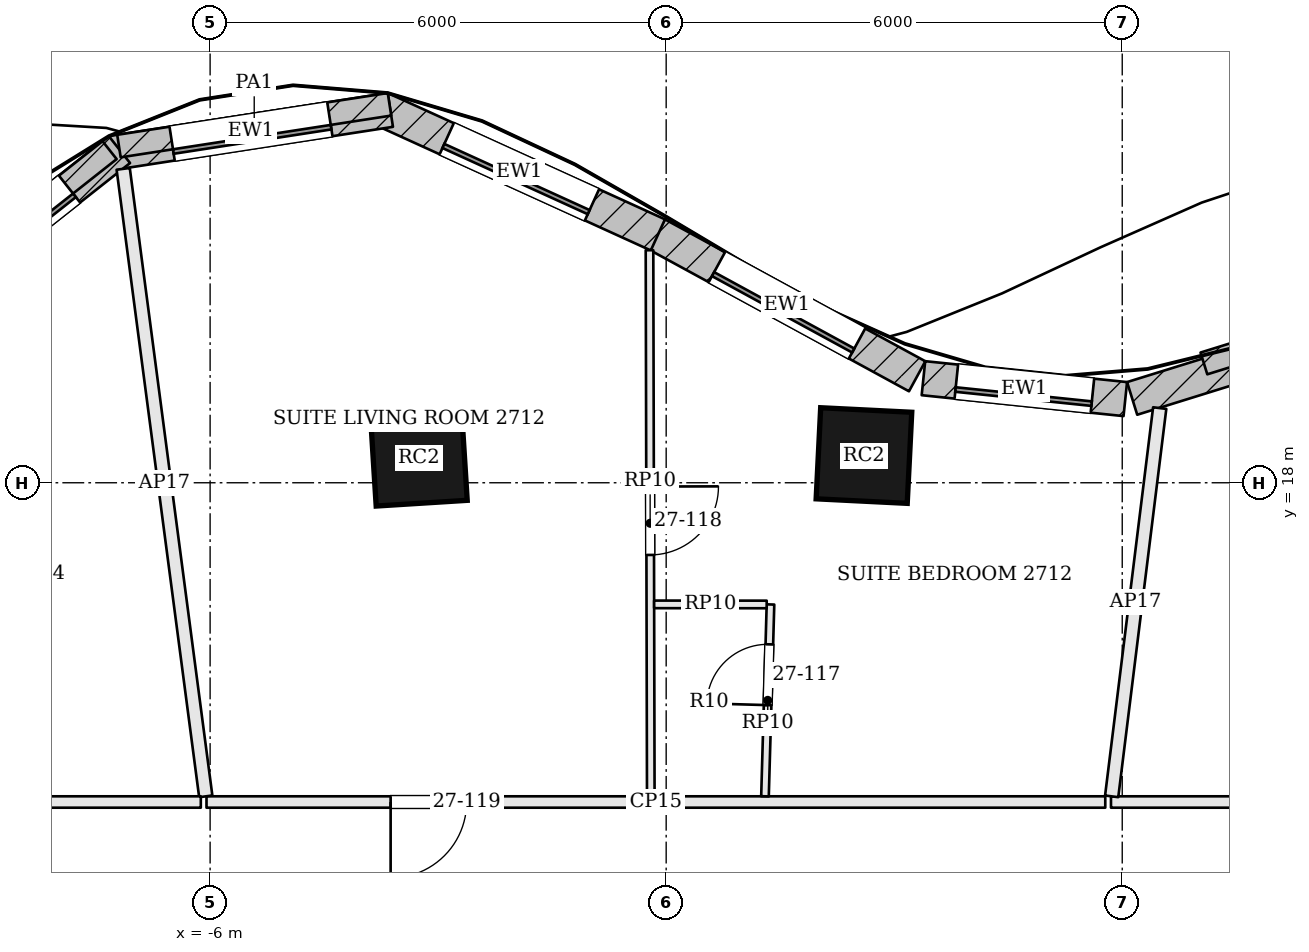
"""IFC4 building model, lengths in metres.
Left out: names, types, materials, properties, quantities, classifications, styles, units other than length and angle.
Written with IfcOpenShell. Run it as: python <this file> out.ifc"""

import sys

from ifc_helpers import new_model, si_unit, direction, frame, frame_2d, origin, origin_2d, place, context, subcontext, project, spatial, rectangle, extrude, element, fill, save


model = new_model("IFC4")
c1 = context("Model", 3, precision=1e-05, world=origin(), true_north=direction((0.0, 1.0)))
c2 = subcontext(c1, "Body", "Model", "MODEL_VIEW")
j1 = project(units=[si_unit("LENGTHUNIT", "METRE"), si_unit("PLANEANGLEUNIT", "RADIAN")], contexts=[c1])
p1 = place(None, origin())
s1 = spatial("IfcSite", under=j1, at=p1, CompositionType="ELEMENT")
p2 = place(p1, origin())
s2 = spatial("IfcBuilding", under=s1, at=p2, CompositionType="ELEMENT")
p3 = place(p2, frame((0.0, 0.0, 114.0)))
s3 = spatial("IfcBuildingStorey", under=s2, at=p3, CompositionType="ELEMENT", Elevation=114.0)
for number, where, z_axis, x_axis in (
    (1, (2.602, 18.358, 0.0), (0.0, 0.0, 1.0), (-0.999, 0.05, 0.0)),
    (2, (-3.254, 18.33, 0.0), (0.0, 0.0, 1.0), (-0.998, -0.063, 0.0)),
):
    element("IfcColumn", number, at=place(p3, frame(where, z_axis=z_axis, x_axis=x_axis)), inside=s3, PredefinedType="COLUMN", context=c2, shape_type="SweptSolid", body=[
        extrude(rectangle(XDim=1.2, YDim=1.2, at=origin_2d()), origin(), (0.0, 0.0, 1.0), 3.6),
    ])
p4 = place(p3, frame((11.007, 20.625, 0.0), z_axis=(0.0, 0.0, 1.0), x_axis=(-0.954949254112, -0.296769139352, 0.0)))
e3 = element("IfcWall", 3, at=p4, inside=s3, PredefinedType="SOLIDWALL", context=c2, shape_type="SweptSolid", body=[
    extrude(rectangle(XDim=5.106, YDim=0.45, at=frame_2d((2.553, 0.0))), origin(), (0.0, 0.0, 1.0), 3.4),
])
p5 = place(p4, frame((1.503, 0.0, 0.9)))
e4 = element("IfcOpeningElement", 4, at=p5, cuts=e3, PredefinedType="OPENING", context=c2, shape_type="SweptSolid", body=[
    extrude(rectangle(XDim=2.1, YDim=2.0, at=frame_2d((1.05, 1.0))), frame((0.0, 0.235, 0.0), z_axis=(0.0, -1.0, 0.0), x_axis=(1.0, 0.0, 0.0)), (0.0, 0.0, 1.0), 0.47),
])
p6 = place(p3, frame((6.04, 19.101, 0.0), z_axis=(0.0, 0.0, 1.0), x_axis=(-0.994675968472, 0.103052014752, 0.0)))
e5 = element("IfcWall", 5, at=p6, inside=s3, PredefinedType="SOLIDWALL", context=c2, shape_type="SweptSolid", body=[
    extrude(rectangle(XDim=2.67, YDim=0.45, at=frame_2d((1.335, 0.0))), origin(), (0.0, 0.0, 1.0), 3.4),
])
p7 = place(p6, frame((0.435, 0.0, 0.9)))
e6 = element("IfcOpeningElement", 6, at=p7, cuts=e5, PredefinedType="OPENING", context=c2, shape_type="SweptSolid", body=[
    extrude(rectangle(XDim=1.8, YDim=2.0, at=frame_2d((0.9, 1.0))), frame((0.0, 0.235, 0.0), z_axis=(0.0, -1.0, 0.0), x_axis=(1.0, 0.0, 0.0)), (0.0, 0.0, 1.0), 0.47),
])
p8 = place(p3, frame((3.302, 19.401, 0.0), z_axis=(0.0, 0.0, 1.0), x_axis=(-0.878060540763, 0.47854956562, 0.0)))
e7 = element("IfcWall", 7, at=p8, inside=s3, PredefinedType="SOLIDWALL", context=c2, shape_type="SweptSolid", body=[
    extrude(rectangle(XDim=3.901, YDim=0.45, at=frame_2d((1.951, 0.0))), origin(), (0.0, 0.0, 1.0), 3.4),
])
p9 = place(p8, frame((0.901, 0.0, 0.9)))
e8 = element("IfcOpeningElement", 8, at=p9, cuts=e7, PredefinedType="OPENING", context=c2, shape_type="SweptSolid", body=[
    extrude(rectangle(XDim=2.1, YDim=2.0, at=frame_2d((1.05, 1.0))), frame((0.0, 0.235, 0.0), z_axis=(0.0, -1.0, 0.0), x_axis=(1.0, 0.0, 0.0)), (0.0, 0.0, 1.0), 0.47),
])
p10 = place(p3, frame((-0.109, 21.261, 0.0), z_axis=(0.0, 0.0, 1.0), x_axis=(-0.910040573706, 0.414519184367, 0.0)))
e9 = element("IfcWall", 9, at=p10, inside=s3, PredefinedType="SOLIDWALL", context=c2, shape_type="SweptSolid", body=[
    extrude(rectangle(XDim=4.006, YDim=0.45, at=frame_2d((2.003, 0.0))), origin(), (0.0, 0.0, 1.0), 3.4),
])
p11 = place(p10, frame((0.953, 0.0, 0.9)))
e10 = element("IfcOpeningElement", 10, at=p11, cuts=e9, PredefinedType="OPENING", context=c2, shape_type="SweptSolid", body=[
    extrude(rectangle(XDim=2.1, YDim=2.0, at=frame_2d((1.05, 1.0))), frame((0.0, 0.235, 0.0), z_axis=(0.0, -1.0, 0.0), x_axis=(1.0, 0.0, 0.0)), (0.0, 0.0, 1.0), 0.47),
])
p12 = place(p3, frame((-3.629, 22.905, 0.0), z_axis=(0.0, 0.0, 1.0), x_axis=(-0.988300084321, -0.152521943772, 0.0)))
e11 = element("IfcWall", 11, at=p12, inside=s3, PredefinedType="SOLIDWALL", context=c2, shape_type="SweptSolid", body=[
    extrude(rectangle(XDim=3.71, YDim=0.45, at=frame_2d((1.855, 0.0))), origin(), (0.0, 0.0, 1.0), 3.4),
])
p13 = place(p12, frame((0.805, 0.0, 0.9)))
e12 = element("IfcOpeningElement", 12, at=p13, cuts=e11, PredefinedType="OPENING", context=c2, shape_type="SweptSolid", body=[
    extrude(rectangle(XDim=2.1, YDim=2.0, at=frame_2d((1.05, 1.0))), frame((0.0, 0.235, 0.0), z_axis=(0.0, -1.0, 0.0), x_axis=(1.0, 0.0, 0.0)), (0.0, 0.0, 1.0), 0.47),
])
p14 = place(p3, frame((-7.193, 22.383, 0.0), z_axis=(0.0, 0.0, 1.0), x_axis=(-0.784803291184, -0.619744942816, 0.0)))
e13 = element("IfcWall", 13, at=p14, inside=s3, PredefinedType="SOLIDWALL", context=c2, shape_type="SweptSolid", body=[
    extrude(rectangle(XDim=3.775, YDim=0.45, at=frame_2d((1.887, 0.0))), origin(), (0.0, 0.0, 1.0), 3.4),
])
p15 = place(p14, frame((0.837, 0.0, 0.9)))
e14 = element("IfcOpeningElement", 14, at=p15, cuts=e13, PredefinedType="OPENING", context=c2, shape_type="SweptSolid", body=[
    extrude(rectangle(XDim=2.1, YDim=2.0, at=frame_2d((1.05, 1.0))), frame((0.0, 0.235, 0.0), z_axis=(0.0, -1.0, 0.0), x_axis=(1.0, 0.0, 0.0)), (0.0, 0.0, 1.0), 0.47),
])
p16 = place(p3, frame((10.59, 20.662, 3.6), z_axis=(0.0, 0.0, 1.0), x_axis=(-0.954933257017, -0.296820610207, 0.0)))
e15 = element("IfcWall", 15, at=p16, inside=s3, PredefinedType="PARAPET", context=c2, shape_type="SweptSolid", body=[
    extrude(rectangle(XDim=3.681, YDim=0.3, at=frame_2d((1.84, 0.0))), origin(), (0.0, 0.0, 1.0), 1.1),
])
p17 = place(p3, frame((-3.64, 22.979, 3.6), z_axis=(0.0, 0.0, 1.0), x_axis=(-0.988299486994, -0.152525814235, 0.0)))
e16 = element("IfcWall", 16, at=p17, inside=s3, PredefinedType="PARAPET", context=c2, shape_type="SweptSolid", body=[
    extrude(rectangle(XDim=3.602, YDim=0.3, at=frame_2d((1.801, 0.0))), origin(), (0.0, 0.0, 1.0), 1.1),
])
p18 = place(p3, frame((-7.323, 22.376, 3.6), z_axis=(0.0, 0.0, 1.0), x_axis=(-0.784819122577, -0.61972489448, 0.0)))
e17 = element("IfcWall", 17, at=p18, inside=s3, PredefinedType="PARAPET", context=c2, shape_type="SweptSolid", body=[
    extrude(rectangle(XDim=3.633, YDim=0.3, at=frame_2d((1.817, 0.0))), origin(), (0.0, 0.0, 1.0), 1.1),
])
p19 = place(p3, frame((14.725, 13.8, 0.0), z_axis=(0.0, 0.0, 1.0), x_axis=(-1.0, 0.0, 0.0)))
e18 = element("IfcWall", 18, at=p19, inside=s3, PredefinedType="PARTITIONING", context=c2, shape_type="SweptSolid", body=[
    extrude(rectangle(XDim=8.873, YDim=0.15, at=frame_2d((4.437, 0.0))), origin(), (0.0, 0.0, 1.0), 2.784),
])
p20 = place(p19, frame((2.316, 0.0, 0.0)))
e19 = element("IfcOpeningElement", 19, at=p20, cuts=e18, PredefinedType="OPENING", context=c2, shape_type="SweptSolid", body=[
    extrude(rectangle(XDim=0.9, YDim=2.4, at=frame_2d((0.45, 1.2))), frame((0.0, 0.085, 0.0), z_axis=(0.0, -1.0, 0.0), x_axis=(1.0, 0.0, 0.0)), (0.0, 0.0, 1.0), 0.17),
])
p21 = place(p3, frame((6.493, 18.982, 0.0), z_axis=(0.0, 0.0, 1.0), x_axis=(-0.122808633413, -0.992430370131, 0.0)))
e20 = element("IfcWall", 20, at=p21, inside=s3, PredefinedType="PARTITIONING", context=c2, shape_type="SweptSolid", body=[
    extrude(rectangle(XDim=5.147, YDim=0.175, at=frame_2d((2.573, 0.0))), origin(), (0.0, 0.0, 1.0), 2.784),
])
p22 = place(p3, frame((5.777, 13.8, 0.0), z_axis=(0.0, 0.0, 1.0), x_axis=(-1.0, 0.0, 0.0)))
e21 = element("IfcWall", 21, at=p22, inside=s3, PredefinedType="PARTITIONING", context=c2, shape_type="SweptSolid", body=[
    extrude(rectangle(XDim=11.824, YDim=0.15, at=frame_2d((5.912, 0.0))), origin(), (0.0, 0.0, 1.0), 2.784),
])
p23 = place(p22, frame((8.402, 0.0, 0.0)))
e22 = element("IfcOpeningElement", 22, at=p23, cuts=e21, PredefinedType="OPENING", context=c2, shape_type="SweptSolid", body=[
    extrude(rectangle(XDim=1.0, YDim=2.1, at=frame_2d((0.5, 1.05))), frame((0.0, 0.085, 0.0), z_axis=(0.0, -1.0, 0.0), x_axis=(1.0, 0.0, 0.0)), (0.0, 0.0, 1.0), 0.17),
])
p24 = place(p3, frame((-7.144, 22.13, 0.0), z_axis=(0.0, 0.0, 1.0), x_axis=(0.130452237095, -0.991454594945, 0.0)))
e23 = element("IfcWall", 23, at=p24, inside=s3, PredefinedType="PARTITIONING", context=c2, shape_type="SweptSolid", body=[
    extrude(rectangle(XDim=8.326, YDim=0.175, at=frame_2d((4.163, 0.0))), origin(), (0.0, 0.0, 1.0), 2.784),
])
p25 = place(p3, frame((-6.123, 13.8, 0.0), z_axis=(0.0, 0.0, 1.0), x_axis=(-1.0, 0.0, 0.0)))
e24 = element("IfcWall", 24, at=p25, inside=s3, PredefinedType="PARTITIONING", context=c2, shape_type="SweptSolid", body=[
    extrude(rectangle(XDim=8.677, YDim=0.15, at=frame_2d((4.339, 0.0))), origin(), (0.0, 0.0, 1.0), 2.784),
])
p26 = place(p25, frame((5.763, 0.0, 0.0)))
e25 = element("IfcOpeningElement", 25, at=p26, cuts=e24, PredefinedType="OPENING", context=c2, shape_type="SweptSolid", body=[
    extrude(rectangle(XDim=0.9, YDim=2.4, at=frame_2d((0.45, 1.2))), frame((0.0, 0.085, 0.0), z_axis=(0.0, -1.0, 0.0), x_axis=(1.0, 0.0, 0.0)), (0.0, 0.0, 1.0), 0.17),
])
p27 = place(p3, frame((-0.219, 21.059, 0.0), z_axis=(0.0, 0.0, 1.0), x_axis=(0.002344778955, -0.999997251002, 0.0)))
e26 = element("IfcWall", 26, at=p27, inside=s3, PredefinedType="PARTITIONING", context=c2, shape_type="SweptSolid", body=[
    extrude(rectangle(XDim=7.184, YDim=0.1, at=frame_2d((3.592, 0.0))), origin(), (0.0, 0.0, 1.0), 2.884),
])
p28 = place(p27, frame((3.109, 0.0, 0.0)))
e27 = element("IfcOpeningElement", 27, at=p28, cuts=e26, PredefinedType="OPENING", context=c2, shape_type="SweptSolid", body=[
    extrude(rectangle(XDim=0.9, YDim=2.4, at=frame_2d((0.45, 1.2))), frame((0.0, 0.06, 0.0), z_axis=(0.0, -1.0, 0.0), x_axis=(1.0, 0.0, 0.0)), (0.0, 0.0, 1.0), 0.12),
])
p29 = place(p3, frame((1.3, 13.875, 0.0), z_axis=(0.0, 0.0, 1.0), x_axis=(0.028620501399, 0.999590349543, 0.0)))
e28 = element("IfcWall", 28, at=p29, inside=s3, PredefinedType="PARTITIONING", context=c2, shape_type="SweptSolid", body=[
    extrude(rectangle(XDim=2.525, YDim=0.1, at=frame_2d((1.262, 0.0))), origin(), (0.0, 0.0, 1.0), 2.884),
])
p30 = place(p29, frame((1.2, 0.0, 0.0)))
e29 = element("IfcOpeningElement", 29, at=p30, cuts=e28, PredefinedType="OPENING", context=c2, shape_type="SweptSolid", body=[
    extrude(rectangle(XDim=0.8, YDim=2.1, at=frame_2d((0.4, 1.05))), frame((0.0, 0.06, 0.0), z_axis=(0.0, -1.0, 0.0), x_axis=(1.0, 0.0, 0.0)), (0.0, 0.0, 1.0), 0.12),
])
p31 = place(p3, frame((1.323, 16.399, 0.0), z_axis=(0.0, 0.0, 1.0), x_axis=(-0.999999782516, 0.000659521703, 0.0)))
e30 = element("IfcWall", 30, at=p31, inside=s3, PredefinedType="PARTITIONING", context=c2, shape_type="SweptSolid", body=[
    extrude(rectangle(XDim=1.481, YDim=0.1, at=frame_2d((0.74, 0.0))), origin(), (0.0, 0.0, 1.0), 2.884),
])
p32 = place(p7, origin())
e31 = element("IfcWindow", 31, at=p32, inside=s3, PartitioningType="SINGLE_PANEL", PredefinedType="WINDOW", context=c2, shape_type="SweptSolid", body=[
    extrude(rectangle(XDim=1.8, YDim=2.0, at=frame_2d((0.9, 1.0))), frame((0.0, 0.135, 0.0), z_axis=(0.0, -1.0, 0.0), x_axis=(1.0, 0.0, 0.0)), (0.0, 0.0, 1.0), 0.06),
])
fill(e6, e31)
p33 = place(p9, origin())
e32 = element("IfcWindow", 32, at=p33, inside=s3, PartitioningType="SINGLE_PANEL", PredefinedType="WINDOW", context=c2, shape_type="SweptSolid", body=[
    extrude(rectangle(XDim=2.1, YDim=2.0, at=frame_2d((1.05, 1.0))), frame((0.0, 0.135, 0.0), z_axis=(0.0, -1.0, 0.0), x_axis=(1.0, 0.0, 0.0)), (0.0, 0.0, 1.0), 0.06),
])
fill(e8, e32)
p34 = place(p11, origin())
e33 = element("IfcWindow", 33, at=p34, inside=s3, PartitioningType="SINGLE_PANEL", PredefinedType="WINDOW", context=c2, shape_type="SweptSolid", body=[
    extrude(rectangle(XDim=2.1, YDim=2.0, at=frame_2d((1.05, 1.0))), frame((0.0, 0.135, 0.0), z_axis=(0.0, -1.0, 0.0), x_axis=(1.0, 0.0, 0.0)), (0.0, 0.0, 1.0), 0.06),
])
fill(e10, e33)
p35 = place(p13, origin())
e34 = element("IfcWindow", 34, at=p35, inside=s3, PartitioningType="SINGLE_PANEL", PredefinedType="WINDOW", context=c2, shape_type="SweptSolid", body=[
    extrude(rectangle(XDim=2.1, YDim=2.0, at=frame_2d((1.05, 1.0))), frame((0.0, 0.135, 0.0), z_axis=(0.0, -1.0, 0.0), x_axis=(1.0, 0.0, 0.0)), (0.0, 0.0, 1.0), 0.06),
])
fill(e12, e34)
p36 = place(p15, origin())
e35 = element("IfcWindow", 35, at=p36, inside=s3, PartitioningType="SINGLE_PANEL", PredefinedType="WINDOW", context=c2, shape_type="SweptSolid", body=[
    extrude(rectangle(XDim=2.1, YDim=2.0, at=frame_2d((1.05, 1.0))), frame((0.0, 0.135, 0.0), z_axis=(0.0, -1.0, 0.0), x_axis=(1.0, 0.0, 0.0)), (0.0, 0.0, 1.0), 0.06),
])
fill(e14, e35)
p37 = place(p30, origin())
e36 = element("IfcDoor", 36, at=p37, inside=s3, OperationType="SINGLE_SWING_LEFT", PredefinedType="DOOR", context=c2, shape_type="SweptSolid", body=[
    extrude(rectangle(XDim=0.8, YDim=2.1, at=frame_2d((0.4, 1.05))), frame((0.0, 0.025, 0.0), z_axis=(0.0, -1.0, 0.0), x_axis=(1.0, 0.0, 0.0)), (0.0, 0.0, 1.0), 0.05),
])
fill(e29, e36)
p38 = place(p28, origin())
e37 = element("IfcDoor", 37, at=p38, inside=s3, OperationType="SINGLE_SWING_LEFT", PredefinedType="DOOR", context=c2, shape_type="SweptSolid", body=[
    extrude(rectangle(XDim=0.9, YDim=2.4, at=frame_2d((0.45, 1.2))), frame((0.0, 0.025, 0.0), z_axis=(0.0, -1.0, 0.0), x_axis=(1.0, 0.0, 0.0)), (0.0, 0.0, 1.0), 0.05),
])
fill(e27, e37)
p39 = place(p23, origin())
e38 = element("IfcDoor", 38, at=p39, inside=s3, OperationType="SINGLE_SWING_RIGHT", PredefinedType="DOOR", context=c2, shape_type="SweptSolid", body=[
    extrude(rectangle(XDim=1.0, YDim=2.1, at=frame_2d((0.5, 1.05))), frame((0.0, 0.025, 0.0), z_axis=(0.0, -1.0, 0.0), x_axis=(1.0, 0.0, 0.0)), (0.0, 0.0, 1.0), 0.05),
])
fill(e22, e38)
save(model, sys.argv[1])
